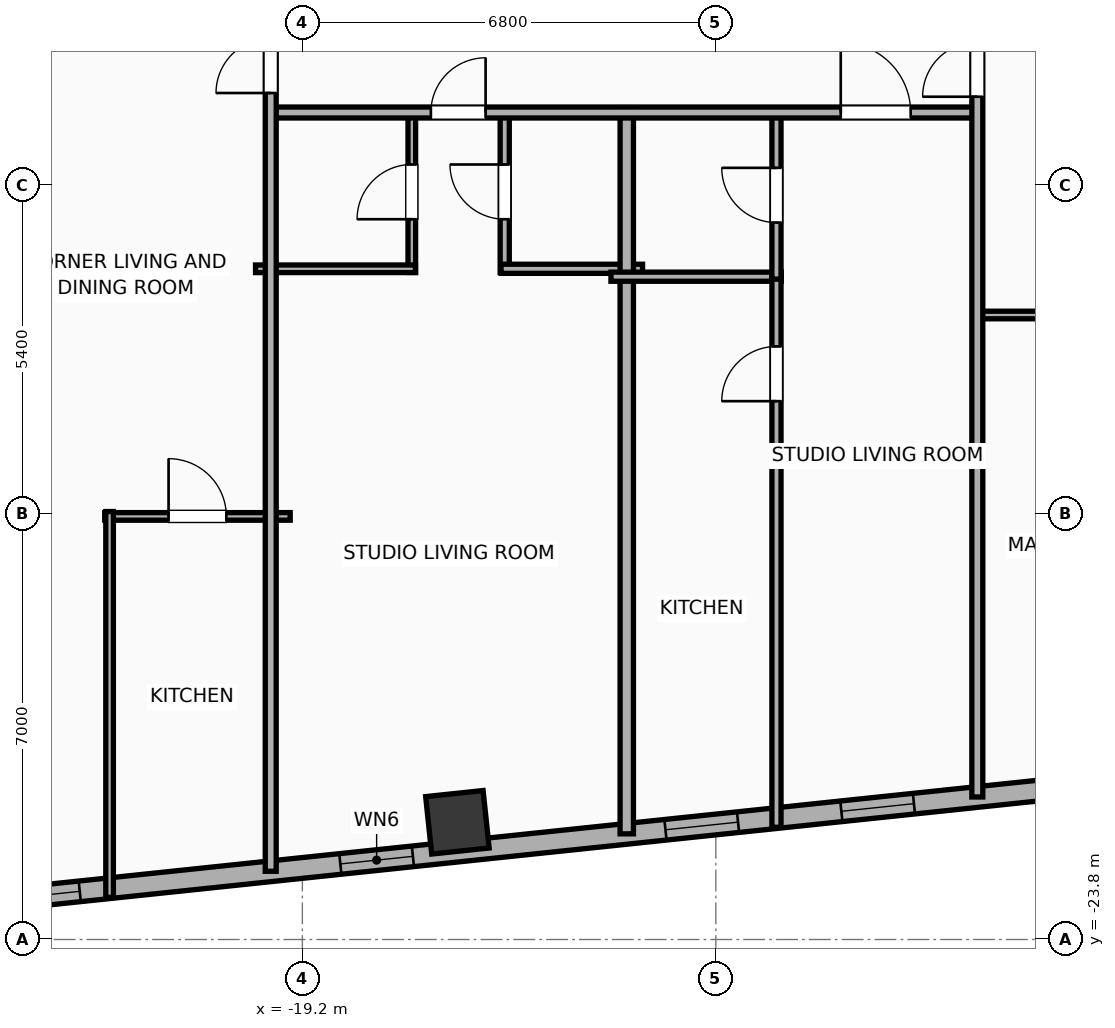
"""IFC4 building model, lengths in metres.
Left out: names, types, materials, properties, quantities, classifications, styles, units other than length and angle.
Written with IfcOpenShell. Run it as: python <this file> out.ifc"""

import sys

from ifc_helpers import new_model, si_unit, direction, frame, frame_2d, origin, origin_2d, place, context, subcontext, project, spatial, rectangle, hollow_rectangle, extrude, element, fill, save


model = new_model("IFC4")
c1 = context("Model", 3, precision=1e-05, world=origin(), true_north=direction((0.0, 1.0)))
c2 = subcontext(c1, "Body", "Model", "MODEL_VIEW")
j1 = project(units=[si_unit("LENGTHUNIT", "METRE"), si_unit("PLANEANGLEUNIT", "RADIAN")], contexts=[c1])
p1 = place(None, origin())
s1 = spatial("IfcSite", under=j1, at=p1, CompositionType="ELEMENT")
p2 = place(p1, origin())
s2 = spatial("IfcBuilding", under=s1, at=p2, CompositionType="ELEMENT")
p3 = place(p2, frame((0.0, 0.0, 187.2)))
s3 = spatial("IfcBuildingStorey", under=s2, at=p3, CompositionType="ELEMENT", Elevation=187.2)
p4 = place(p3, frame((-16.65, -21.873, 0.0), z_axis=(0.0, 0.0, 1.0), x_axis=(0.994521895368, 0.104528463268, 0.0)))
e1 = element("IfcColumn", 1, at=p4, inside=s3, PredefinedType="COLUMN", context=c2, shape_type="SweptSolid", body=[
    extrude(hollow_rectangle(XDim=0.95, YDim=0.95, WallThickness=0.032, at=origin_2d()), origin(), (0.0, 0.0, 1.0), 3.9),
])
p5 = place(p3, frame((24.756, -18.003, 0.0), z_axis=(0.0, 0.0, 1.0), x_axis=(-0.99452160744, -0.104531202687, 0.0)))
e2 = element("IfcWall", 2, at=p5, inside=s3, PredefinedType="ELEMENTEDWALL", context=c2, shape_type="SweptSolid", body=[
    extrude(rectangle(XDim=51.967, YDim=0.34, at=frame_2d((25.983, 0.0))), origin(), (0.0, 0.0, 1.0), 3.65),
])
p6 = place(p5, frame((25.633, 0.0, 0.75)))
e3 = element("IfcOpeningElement", 3, at=p6, cuts=e2, PredefinedType="OPENING", context=c2, shape_type="SweptSolid", body=[
    extrude(rectangle(XDim=2.4, YDim=2.1, at=frame_2d((1.2, 1.05))), frame((0.0, 0.18, 0.0), z_axis=(0.0, -1.0, 0.0), x_axis=(1.0, 0.0, 0.0)), (0.0, 0.0, 1.0), 0.36),
])
p7 = place(p5, frame((42.369, 0.0, 0.75)))
e4 = element("IfcOpeningElement", 4, at=p7, cuts=e2, PredefinedType="OPENING", context=c2, shape_type="SweptSolid", body=[
    extrude(rectangle(XDim=1.2, YDim=2.05, at=frame_2d((0.6, 1.025))), frame((0.0, 0.18, 0.0), z_axis=(0.0, -1.0, 0.0), x_axis=(1.0, 0.0, 0.0)), (0.0, 0.0, 1.0), 0.36),
])
p8 = place(p5, frame((34.085, 0.0, 0.75)))
e5 = element("IfcOpeningElement", 5, at=p8, cuts=e2, PredefinedType="OPENING", context=c2, shape_type="SweptSolid", body=[
    extrude(rectangle(XDim=1.2, YDim=2.05, at=frame_2d((0.6, 1.025))), frame((0.0, 0.18, 0.0), z_axis=(0.0, -1.0, 0.0), x_axis=(1.0, 0.0, 0.0)), (0.0, 0.0, 1.0), 0.36),
])
p9 = place(p5, frame((36.993, 0.0, 0.75)))
e6 = element("IfcOpeningElement", 6, at=p9, cuts=e2, PredefinedType="OPENING", context=c2, shape_type="SweptSolid", body=[
    extrude(rectangle(XDim=1.2, YDim=2.05, at=frame_2d((0.6, 1.025))), frame((0.0, 0.18, 0.0), z_axis=(0.0, -1.0, 0.0), x_axis=(1.0, 0.0, 0.0)), (0.0, 0.0, 1.0), 0.36),
])
p10 = place(p5, frame((14.397, 0.0, 0.75)))
e7 = element("IfcOpeningElement", 7, at=p10, cuts=e2, PredefinedType="OPENING", context=c2, shape_type="SweptSolid", body=[
    extrude(rectangle(XDim=1.2, YDim=2.05, at=frame_2d((0.6, 1.025))), frame((0.0, 0.18, 0.0), z_axis=(0.0, -1.0, 0.0), x_axis=(1.0, 0.0, 0.0)), (0.0, 0.0, 1.0), 0.36),
])
p11 = place(p5, frame((11.489, 0.0, 0.75)))
e8 = element("IfcOpeningElement", 8, at=p11, cuts=e2, PredefinedType="OPENING", context=c2, shape_type="SweptSolid", body=[
    extrude(rectangle(XDim=1.2, YDim=2.05, at=frame_2d((0.6, 1.025))), frame((0.0, 0.18, 0.0), z_axis=(0.0, -1.0, 0.0), x_axis=(1.0, 0.0, 0.0)), (0.0, 0.0, 1.0), 0.36),
])
p12 = place(p5, frame((8.521, 0.0, 0.75)))
e9 = element("IfcOpeningElement", 9, at=p12, cuts=e2, PredefinedType="OPENING", context=c2, shape_type="SweptSolid", body=[
    extrude(rectangle(XDim=1.2, YDim=2.05, at=frame_2d((0.6, 1.025))), frame((0.0, 0.18, 0.0), z_axis=(0.0, -1.0, 0.0), x_axis=(1.0, 0.0, 0.0)), (0.0, 0.0, 1.0), 0.36),
])
p13 = place(p5, frame((5.582, 0.0, 0.75)))
e10 = element("IfcOpeningElement", 10, at=p13, cuts=e2, PredefinedType="OPENING", context=c2, shape_type="SweptSolid", body=[
    extrude(rectangle(XDim=1.2, YDim=2.05, at=frame_2d((0.6, 1.025))), frame((0.0, 0.18, 0.0), z_axis=(0.0, -1.0, 0.0), x_axis=(1.0, 0.0, 0.0)), (0.0, 0.0, 1.0), 0.36),
])
p14 = place(p5, frame((29.313, 0.0, 0.75)))
e11 = element("IfcOpeningElement", 11, at=p14, cuts=e2, PredefinedType="OPENING", context=c2, shape_type="SweptSolid", body=[
    extrude(rectangle(XDim=1.2, YDim=2.05, at=frame_2d((0.6, 1.025))), frame((0.0, 0.18, 0.0), z_axis=(0.0, -1.0, 0.0), x_axis=(1.0, 0.0, 0.0)), (0.0, 0.0, 1.0), 0.36),
])
p15 = place(p5, frame((22.248, 0.0, 0.75)))
e12 = element("IfcOpeningElement", 12, at=p15, cuts=e2, PredefinedType="OPENING", context=c2, shape_type="SweptSolid", body=[
    extrude(rectangle(XDim=1.2, YDim=2.05, at=frame_2d((0.6, 1.025))), frame((0.0, 0.18, 0.0), z_axis=(0.0, -1.0, 0.0), x_axis=(1.0, 0.0, 0.0)), (0.0, 0.0, 1.0), 0.36),
])
p16 = place(p5, frame((18.186, 0.0, 0.75)))
e13 = element("IfcOpeningElement", 13, at=p16, cuts=e2, PredefinedType="OPENING", context=c2, shape_type="SweptSolid", body=[
    extrude(rectangle(XDim=1.2, YDim=2.05, at=frame_2d((0.6, 1.025))), frame((0.0, 0.18, 0.0), z_axis=(0.0, -1.0, 0.0), x_axis=(1.0, 0.0, 0.0)), (0.0, 0.0, 1.0), 0.36),
])
p17 = place(p5, frame((47.879, 0.0, 0.75)))
e14 = element("IfcOpeningElement", 14, at=p17, cuts=e2, PredefinedType="OPENING", context=c2, shape_type="SweptSolid", body=[
    extrude(rectangle(XDim=1.2, YDim=2.05, at=frame_2d((0.6, 1.025))), frame((0.0, 0.18, 0.0), z_axis=(0.0, -1.0, 0.0), x_axis=(1.0, 0.0, 0.0)), (0.0, 0.0, 1.0), 0.36),
])
p18 = place(p5, frame((49.844, 0.0, 0.75)))
e15 = element("IfcOpeningElement", 15, at=p18, cuts=e2, PredefinedType="OPENING", context=c2, shape_type="SweptSolid", body=[
    extrude(rectangle(XDim=1.2, YDim=2.05, at=frame_2d((0.6, 1.025))), frame((0.0, 0.18, 0.0), z_axis=(0.0, -1.0, 0.0), x_axis=(1.0, 0.0, 0.0)), (0.0, 0.0, 1.0), 0.36),
])
p19 = place(p5, frame((0.925, 0.0, 0.75)))
e16 = element("IfcOpeningElement", 16, at=p19, cuts=e2, PredefinedType="OPENING", context=c2, shape_type="SweptSolid", body=[
    extrude(rectangle(XDim=1.2, YDim=2.05, at=frame_2d((0.6, 1.025))), frame((0.0, 0.18, 0.0), z_axis=(0.0, -1.0, 0.0), x_axis=(1.0, 0.0, 0.0)), (0.0, 0.0, 1.0), 0.36),
])
p20 = place(p3, frame((-17.4, -12.83, 0.0), z_axis=(0.0, 0.0, 1.0), x_axis=(0.0, 1.0, 0.0)))
e17 = element("IfcWall", 17, at=p20, inside=s3, PredefinedType="PARTITIONING", context=c2, shape_type="SweptSolid", body=[
    extrude(rectangle(XDim=2.65, YDim=0.125, at=frame_2d((1.325, 0.0))), origin(), (0.0, 0.0, 1.0), 3.65),
])
p21 = place(p20, frame((0.875, 0.0, 0.0)))
e18 = element("IfcOpeningElement", 18, at=p21, cuts=e17, PredefinedType="OPENING", context=c2, shape_type="SweptSolid", body=[
    extrude(rectangle(XDim=0.9, YDim=2.05, at=frame_2d((0.45, 1.025))), frame((0.0, 0.073, 0.0), z_axis=(0.0, -1.0, 0.0), x_axis=(1.0, 0.0, 0.0)), (0.0, 0.0, 1.0), 0.145),
])
p22 = place(p3, frame((-15.872, -12.83, 0.0), z_axis=(0.0, 0.0, 1.0), x_axis=(0.0, 1.0, 0.0)))
e19 = element("IfcWall", 19, at=p22, inside=s3, PredefinedType="PLUMBINGWALL", context=c2, shape_type="SweptSolid", body=[
    extrude(rectangle(XDim=2.65, YDim=0.15, at=frame_2d((1.325, 0.0))), origin(), (0.0, 0.0, 1.0), 3.04),
])
p23 = place(p22, frame((0.875, 0.0, 0.0)))
e20 = element("IfcOpeningElement", 20, at=p23, cuts=e19, PredefinedType="OPENING", context=c2, shape_type="SweptSolid", body=[
    extrude(rectangle(XDim=0.9, YDim=2.05, at=frame_2d((0.45, 1.025))), frame((0.0, 0.085, 0.0), z_axis=(0.0, -1.0, 0.0), x_axis=(1.0, 0.0, 0.0)), (0.0, 0.0, 1.0), 0.17),
])
p24 = place(p3, frame((-19.97, -12.77, 0.0), z_axis=(0.0, 0.0, 1.0), x_axis=(1.0, 0.0, 0.0)))
e21 = element("IfcWall", 21, at=p24, inside=s3, PredefinedType="PARTITIONING", context=c2, shape_type="SweptSolid", body=[
    extrude(rectangle(XDim=2.63, YDim=0.125, at=frame_2d((1.315, 0.0))), origin(), (0.0, 0.0, 1.0), 3.65),
])
p25 = place(p3, frame((-15.932, -12.77, 0.0), z_axis=(0.0, 0.0, 1.0), x_axis=(1.0, 0.0, 0.0)))
e22 = element("IfcWall", 22, at=p25, inside=s3, PredefinedType="PLUMBINGWALL", context=c2, shape_type="SweptSolid", body=[
    extrude(rectangle(XDim=2.327, YDim=0.15, at=frame_2d((1.164, 0.0))), origin(), (0.0, 0.0, 1.0), 3.65),
])
p26 = place(p3, frame((-13.865, -22.062, 0.0), z_axis=(0.0, 0.0, 1.0), x_axis=(0.0, 1.0, 0.0)))
e23 = element("IfcWall", 23, at=p26, inside=s3, PredefinedType="PARTITIONING", context=c2, shape_type="SweptSolid", body=[
    extrude(rectangle(XDim=11.942, YDim=0.22, at=frame_2d((5.971, 0.0))), origin(), (0.0, 0.0, 1.0), 3.65),
])
p27 = place(p3, frame((-14.125, -12.9, 0.0), z_axis=(0.0, 0.0, 1.0), x_axis=(1.0, 0.0, 0.0)))
e24 = element("IfcWall", 24, at=p27, inside=s3, PredefinedType="PLUMBINGWALL", context=c2, shape_type="SweptSolid", body=[
    extrude(rectangle(XDim=2.802, YDim=0.15, at=frame_2d((1.401, 0.0))), origin(), (0.0, 0.0, 1.0), 3.65),
])
p28 = place(p3, frame((-11.403, -21.954, 0.0), z_axis=(0.0, 0.0, 1.0), x_axis=(0.0, 1.0, 0.0)))
e25 = element("IfcWall", 25, at=p28, inside=s3, PredefinedType="PLUMBINGWALL", context=c2, shape_type="SweptSolid", body=[
    extrude(rectangle(XDim=9.094, YDim=0.15, at=frame_2d((4.547, 0.0))), origin(), (0.0, 0.0, 1.0), 3.65),
])
p29 = place(p28, frame((7.007, 0.0, 0.0)))
e26 = element("IfcOpeningElement", 26, at=p29, cuts=e25, PredefinedType="OPENING", context=c2, shape_type="SweptSolid", body=[
    extrude(rectangle(XDim=0.9, YDim=2.05, at=frame_2d((0.45, 1.025))), frame((0.0, 0.085, 0.0), z_axis=(0.0, -1.0, 0.0), x_axis=(1.0, 0.0, 0.0)), (0.0, 0.0, 1.0), 0.17),
])
p30 = place(p3, frame((-11.403, -12.94, 0.0), z_axis=(0.0, 0.0, 1.0), x_axis=(0.0, 1.0, 0.0)))
e27 = element("IfcWall", 27, at=p30, inside=s3, PredefinedType="PLUMBINGWALL", context=c2, shape_type="SweptSolid", body=[
    extrude(rectangle(XDim=2.76, YDim=0.15, at=frame_2d((1.38, 0.0))), origin(), (0.0, 0.0, 1.0), 3.65),
])
p31 = place(p30, frame((0.93, 0.0, 0.0)))
e28 = element("IfcOpeningElement", 28, at=p31, cuts=e27, PredefinedType="OPENING", context=c2, shape_type="SweptSolid", body=[
    extrude(rectangle(XDim=0.9, YDim=2.05, at=frame_2d((0.45, 1.025))), frame((0.0, 0.085, 0.0), z_axis=(0.0, -1.0, 0.0), x_axis=(1.0, 0.0, 0.0)), (0.0, 0.0, 1.0), 0.17),
])
p32 = place(p3, frame((-19.75, -10.2, 0.0), z_axis=(0.0, 0.0, 1.0), x_axis=(1.0, 0.0, 0.0)))
e29 = element("IfcWall", 29, at=p32, inside=s3, PredefinedType="PARTITIONING", context=c2, shape_type="SweptSolid", body=[
    extrude(rectangle(XDim=11.67, YDim=0.18, at=frame_2d((5.835, 0.0))), origin(), (0.0, 0.0, 1.0), 3.65),
])
p33 = place(p32, frame((2.664, 0.0, 0.0)))
e30 = element("IfcOpeningElement", 30, at=p33, cuts=e29, PredefinedType="OPENING", context=c2, shape_type="SweptSolid", body=[
    extrude(rectangle(XDim=0.9, YDim=2.05, at=frame_2d((0.45, 1.025))), frame((0.0, 0.1, 0.0), z_axis=(0.0, -1.0, 0.0), x_axis=(1.0, 0.0, 0.0)), (0.0, 0.0, 1.0), 0.2),
])
p34 = place(p32, frame((9.404, 0.0, 0.0)))
e31 = element("IfcOpeningElement", 31, at=p34, cuts=e29, PredefinedType="OPENING", context=c2, shape_type="SweptSolid", body=[
    extrude(rectangle(XDim=1.15, YDim=2.05, at=frame_2d((0.575, 1.025))), frame((0.0, 0.1, 0.0), z_axis=(0.0, -1.0, 0.0), x_axis=(1.0, 0.0, 0.0)), (0.0, 0.0, 1.0), 0.2),
])
p35 = place(p3, frame((-8.08, -13.53, 0.0), z_axis=(0.0, 0.0, 1.0), x_axis=(1.0, 0.0, 0.0)))
e32 = element("IfcWall", 32, at=p35, inside=s3, PredefinedType="PARTITIONING", context=c2, shape_type="SweptSolid", body=[
    extrude(rectangle(XDim=8.06, YDim=0.125, at=frame_2d((4.03, 0.0))), origin(), (0.0, 0.0, 1.0), 3.65),
])
p36 = place(p35, frame((1.323, 0.0, 0.0)))
e33 = element("IfcOpeningElement", 33, at=p36, cuts=e32, PredefinedType="OPENING", context=c2, shape_type="SweptSolid", body=[
    extrude(rectangle(XDim=0.9, YDim=2.05, at=frame_2d((0.45, 1.025))), frame((0.0, 0.073, 0.0), z_axis=(0.0, -1.0, 0.0), x_axis=(1.0, 0.0, 0.0)), (0.0, 0.0, 1.0), 0.145),
])
p37 = place(p35, frame((4.547, 0.0, 0.0)))
e34 = element("IfcOpeningElement", 34, at=p37, cuts=e32, PredefinedType="OPENING", context=c2, shape_type="SweptSolid", body=[
    extrude(rectangle(XDim=0.9, YDim=2.05, at=frame_2d((0.45, 1.025))), frame((0.0, 0.073, 0.0), z_axis=(0.0, -1.0, 0.0), x_axis=(1.0, 0.0, 0.0)), (0.0, 0.0, 1.0), 0.145),
])
p38 = place(p3, frame((-8.1, -21.456, 0.0), z_axis=(0.0, 0.0, 1.0), x_axis=(0.0, 1.0, 0.0)))
e35 = element("IfcWall", 35, at=p38, inside=s3, PredefinedType="PARTITIONING", context=c2, shape_type="SweptSolid", body=[
    extrude(rectangle(XDim=12.766, YDim=0.18, at=frame_2d((6.383, 0.0))), origin(), (0.0, 0.0, 1.0), 3.65),
])
p39 = place(p38, frame((11.516, 0.0, 0.0)))
e36 = element("IfcOpeningElement", 36, at=p39, cuts=e35, PredefinedType="OPENING", context=c2, shape_type="SweptSolid", body=[
    extrude(rectangle(XDim=0.9, YDim=2.05, at=frame_2d((0.45, 1.025))), frame((0.0, 0.1, 0.0), z_axis=(0.0, -1.0, 0.0), x_axis=(1.0, 0.0, 0.0)), (0.0, 0.0, 1.0), 0.2),
])
p40 = place(p3, frame((-22.45, -16.842, 0.0), z_axis=(0.0, 0.0, 1.0), x_axis=(1.0, 0.0, 0.0)))
e37 = element("IfcWall", 37, at=p40, inside=s3, PredefinedType="PARTITIONING", context=c2, shape_type="SweptSolid", body=[
    extrude(rectangle(XDim=3.05, YDim=0.125, at=frame_2d((1.525, 0.0))), origin(), (0.0, 0.0, 1.0), 3.65),
])
p41 = place(p40, frame((1.05, 0.0, 0.0)))
e38 = element("IfcOpeningElement", 38, at=p41, cuts=e37, PredefinedType="OPENING", context=c2, shape_type="SweptSolid", body=[
    extrude(rectangle(XDim=0.95, YDim=2.05, at=frame_2d((0.475, 1.025))), frame((0.0, 0.073, 0.0), z_axis=(0.0, -1.0, 0.0), x_axis=(1.0, 0.0, 0.0)), (0.0, 0.0, 1.0), 0.145),
])
p42 = place(p3, frame((-22.37, -23.107, 0.0), z_axis=(0.0, 0.0, 1.0), x_axis=(0.0, 1.0, 0.0)))
e39 = element("IfcWall", 39, at=p42, inside=s3, PredefinedType="PARTITIONING", context=c2, shape_type="SweptSolid", body=[
    extrude(rectangle(XDim=6.345, YDim=0.125, at=frame_2d((3.173, 0.0))), origin(), (0.0, 0.0, 1.0), 3.65),
])
p43 = place(p3, frame((-19.72, -22.678, 0.0), z_axis=(0.0, 0.0, 1.0), x_axis=(0.0, 1.0, 0.0)))
e40 = element("IfcWall", 40, at=p43, inside=s3, PredefinedType="PARTITIONING", context=c2, shape_type="SweptSolid", body=[
    extrude(rectangle(XDim=22.678, YDim=0.18, at=frame_2d((11.339, 0.0))), origin(), (0.0, 0.0, 1.0), 3.65),
])
p44 = place(p43, frame((12.798, 0.0, 0.0)))
e41 = element("IfcOpeningElement", 41, at=p44, cuts=e40, PredefinedType="OPENING", context=c2, shape_type="SweptSolid", body=[
    extrude(rectangle(XDim=0.9, YDim=2.05, at=frame_2d((0.45, 1.025))), frame((0.0, 0.1, 0.0), z_axis=(0.0, -1.0, 0.0), x_axis=(1.0, 0.0, 0.0)), (0.0, 0.0, 1.0), 0.2),
])
p45 = place(p7, origin())
e42 = element("IfcWindow", 42, at=p45, inside=s3, PartitioningType="SINGLE_PANEL", PredefinedType="WINDOW", context=c2, shape_type="SweptSolid", body=[
    extrude(rectangle(XDim=1.2, YDim=2.05, at=frame_2d((0.6, 1.025))), frame((0.0, 0.03, 0.0), z_axis=(0.0, -1.0, 0.0), x_axis=(1.0, 0.0, 0.0)), (0.0, 0.0, 1.0), 0.06),
])
fill(e4, e42)
p46 = place(p8, origin())
e43 = element("IfcWindow", 43, at=p46, inside=s3, PartitioningType="SINGLE_PANEL", PredefinedType="WINDOW", context=c2, shape_type="SweptSolid", body=[
    extrude(rectangle(XDim=1.2, YDim=2.05, at=frame_2d((0.6, 1.025))), frame((0.0, 0.03, 0.0), z_axis=(0.0, -1.0, 0.0), x_axis=(1.0, 0.0, 0.0)), (0.0, 0.0, 1.0), 0.06),
])
fill(e5, e43)
p47 = place(p9, origin())
e44 = element("IfcWindow", 44, at=p47, inside=s3, PartitioningType="SINGLE_PANEL", PredefinedType="WINDOW", context=c2, shape_type="SweptSolid", body=[
    extrude(rectangle(XDim=1.2, YDim=2.05, at=frame_2d((0.6, 1.025))), frame((0.0, 0.03, 0.0), z_axis=(0.0, -1.0, 0.0), x_axis=(1.0, 0.0, 0.0)), (0.0, 0.0, 1.0), 0.06),
])
fill(e6, e44)
p48 = place(p17, origin())
e45 = element("IfcWindow", 45, at=p48, inside=s3, PartitioningType="SINGLE_PANEL", PredefinedType="WINDOW", context=c2, shape_type="SweptSolid", body=[
    extrude(rectangle(XDim=1.2, YDim=2.05, at=frame_2d((0.6, 1.025))), frame((0.0, 0.03, 0.0), z_axis=(0.0, -1.0, 0.0), x_axis=(1.0, 0.0, 0.0)), (0.0, 0.0, 1.0), 0.06),
])
fill(e14, e45)
p49 = place(p21, origin())
e46 = element("IfcDoor", 46, at=p49, inside=s3, OperationType="SINGLE_SWING_LEFT", PredefinedType="DOOR", context=c2, shape_type="SweptSolid", body=[
    extrude(rectangle(XDim=0.9, YDim=2.05, at=frame_2d((0.45, 1.025))), frame((0.0, 0.025, 0.0), z_axis=(0.0, -1.0, 0.0), x_axis=(1.0, 0.0, 0.0)), (0.0, 0.0, 1.0), 0.05),
])
fill(e18, e46)
p50 = place(p23, origin())
e47 = element("IfcDoor", 47, at=p50, inside=s3, OperationType="SINGLE_SWING_RIGHT", PredefinedType="DOOR", context=c2, shape_type="SweptSolid", body=[
    extrude(rectangle(XDim=0.9, YDim=2.05, at=frame_2d((0.45, 1.025))), frame((0.0, 0.025, 0.0), z_axis=(0.0, -1.0, 0.0), x_axis=(1.0, 0.0, 0.0)), (0.0, 0.0, 1.0), 0.05),
])
fill(e20, e47)
p51 = place(p29, origin())
e48 = element("IfcDoor", 48, at=p51, inside=s3, OperationType="SINGLE_SWING_LEFT", PredefinedType="DOOR", context=c2, shape_type="SweptSolid", body=[
    extrude(rectangle(XDim=0.9, YDim=2.05, at=frame_2d((0.45, 1.025))), frame((0.0, 0.025, 0.0), z_axis=(0.0, -1.0, 0.0), x_axis=(1.0, 0.0, 0.0)), (0.0, 0.0, 1.0), 0.05),
])
fill(e26, e48)
p52 = place(p31, origin())
e49 = element("IfcDoor", 49, at=p52, inside=s3, OperationType="SINGLE_SWING_RIGHT", PredefinedType="DOOR", context=c2, shape_type="SweptSolid", body=[
    extrude(rectangle(XDim=0.9, YDim=2.05, at=frame_2d((0.45, 1.025))), frame((0.0, 0.025, 0.0), z_axis=(0.0, -1.0, 0.0), x_axis=(1.0, 0.0, 0.0)), (0.0, 0.0, 1.0), 0.05),
])
fill(e28, e49)
p53 = place(p33, origin())
e50 = element("IfcDoor", 50, at=p53, inside=s3, OperationType="SINGLE_SWING_RIGHT", PredefinedType="DOOR", context=c2, shape_type="SweptSolid", body=[
    extrude(rectangle(XDim=0.9, YDim=2.05, at=frame_2d((0.45, 1.025))), frame((0.0, 0.025, 0.0), z_axis=(0.0, -1.0, 0.0), x_axis=(1.0, 0.0, 0.0)), (0.0, 0.0, 1.0), 0.05),
])
fill(e30, e50)
p54 = place(p34, origin())
e51 = element("IfcDoor", 51, at=p54, inside=s3, OperationType="SINGLE_SWING_LEFT", PredefinedType="DOOR", context=c2, shape_type="SweptSolid", body=[
    extrude(rectangle(XDim=1.15, YDim=2.05, at=frame_2d((0.575, 1.025))), frame((0.0, 0.025, 0.0), z_axis=(0.0, -1.0, 0.0), x_axis=(1.0, 0.0, 0.0)), (0.0, 0.0, 1.0), 0.05),
])
fill(e31, e51)
p55 = place(p39, origin())
e52 = element("IfcDoor", 52, at=p55, inside=s3, OperationType="SINGLE_SWING_LEFT", PredefinedType="DOOR", context=c2, shape_type="SweptSolid", body=[
    extrude(rectangle(XDim=0.9, YDim=2.05, at=frame_2d((0.45, 1.025))), frame((0.0, 0.025, 0.0), z_axis=(0.0, -1.0, 0.0), x_axis=(1.0, 0.0, 0.0)), (0.0, 0.0, 1.0), 0.05),
])
fill(e36, e52)
p56 = place(p41, origin())
e53 = element("IfcDoor", 53, at=p56, inside=s3, OperationType="SINGLE_SWING_LEFT", PredefinedType="DOOR", context=c2, shape_type="SweptSolid", body=[
    extrude(rectangle(XDim=0.95, YDim=2.05, at=frame_2d((0.475, 1.025))), frame((0.0, 0.025, 0.0), z_axis=(0.0, -1.0, 0.0), x_axis=(1.0, 0.0, 0.0)), (0.0, 0.0, 1.0), 0.05),
])
fill(e38, e53)
p57 = place(p44, origin())
e54 = element("IfcDoor", 54, at=p57, inside=s3, OperationType="SINGLE_SWING_LEFT", PredefinedType="DOOR", context=c2, shape_type="SweptSolid", body=[
    extrude(rectangle(XDim=0.9, YDim=2.05, at=frame_2d((0.45, 1.025))), frame((0.0, 0.025, 0.0), z_axis=(0.0, -1.0, 0.0), x_axis=(1.0, 0.0, 0.0)), (0.0, 0.0, 1.0), 0.05),
])
fill(e41, e54)
save(model, sys.argv[1])
